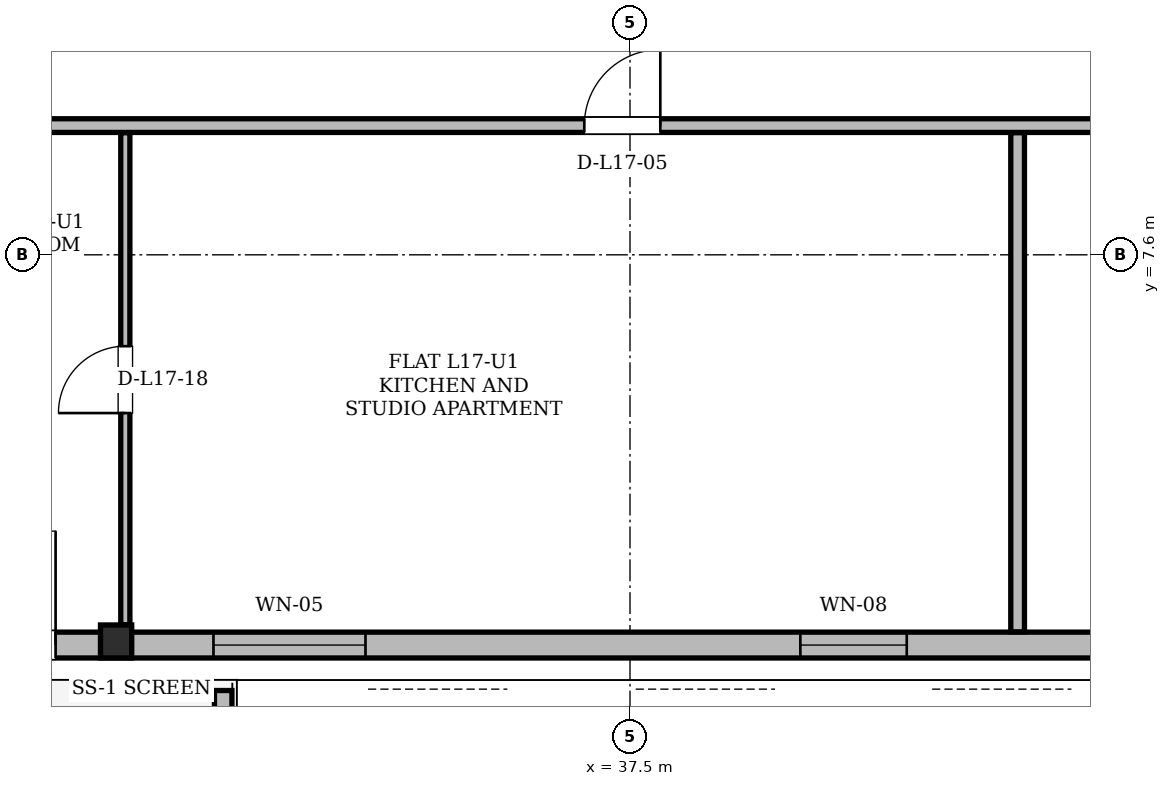
"""IFC4 building model, lengths in metres.
Left out: names, types, materials, properties, quantities, classifications, styles, units other than length and angle.
Written with IfcOpenShell. Run it as: python <this file> out.ifc"""

import sys

from ifc_helpers import new_model, si_unit, direction, frame, frame_2d, origin, origin_2d, place, context, subcontext, project, spatial, polyline, rectangle, i_section, outline, extrude, element, fill, save


model = new_model("IFC4")
c1 = context("Model", 3, precision=1e-05, world=origin(), true_north=direction((0.0, 1.0)))
c2 = subcontext(c1, "Body", "Model", "MODEL_VIEW")
j1 = project(units=[si_unit("LENGTHUNIT", "METRE"), si_unit("PLANEANGLEUNIT", "RADIAN")], contexts=[c1])
p1 = place(None, origin())
s1 = spatial("IfcSite", under=j1, at=p1, CompositionType="ELEMENT")
p2 = place(p1, origin())
s2 = spatial("IfcBuilding", under=s1, at=p2, CompositionType="ELEMENT")
p3 = place(p2, frame((0.0, 0.0, 66.9)))
s3 = spatial("IfcBuildingStorey", under=s2, at=p3, CompositionType="ELEMENT", Elevation=66.9)
p4 = place(p3, frame((30.747, 2.466, 0.005), z_axis=(-0.004893201568, 0.02636891956, 0.999640303639), x_axis=(-0.983214721584, -0.182452216376, 0.0)))
e1 = element("IfcColumn", 1, at=p4, inside=s3, PredefinedType="COLUMN", context=c2, shape_type="SweptSolid", body=[
    extrude(i_section(OverallWidth=0.411, OverallDepth=0.434, WebThickness=0.036, FlangeThickness=0.057, at=origin_2d()), origin(), (0.0, 0.0, 1.0), 3.592),
])
p5 = place(p3, frame((20.618, 2.466, 0.0), z_axis=(0.0, 0.0, 1.0), x_axis=(1.0, 0.0, 0.0)))
e2 = element("IfcWall", 2, at=p5, inside=s3, PredefinedType="SOLIDWALL", context=c2, shape_type="SweptSolid", body=[
    extrude(rectangle(XDim=33.764, YDim=0.34, at=frame_2d((16.882, 0.0))), origin(), (0.0, 0.0, 1.0), 2.494),
])
p6 = place(p5, frame((7.824, 0.0, 0.0)))
e3 = element("IfcOpeningElement", 3, at=p6, cuts=e2, PredefinedType="OPENING", context=c2, shape_type="SweptSolid", body=[
    extrude(rectangle(XDim=1.5, YDim=2.2, at=frame_2d((0.75, 1.1))), frame((0.0, 0.17, 0.0), z_axis=(0.0, -1.0, 0.0), x_axis=(1.0, 0.0, 0.0)), (0.0, 0.0, 1.0), 0.34),
])
p7 = place(p5, frame((26.104, 0.0, 0.0)))
e4 = element("IfcOpeningElement", 4, at=p7, cuts=e2, PredefinedType="OPENING", context=c2, shape_type="SweptSolid", body=[
    extrude(rectangle(XDim=1.5, YDim=2.2, at=frame_2d((0.75, 1.1))), frame((0.0, 0.17, 0.0), z_axis=(0.0, -1.0, 0.0), x_axis=(1.0, 0.0, 0.0)), (0.0, 0.0, 1.0), 0.34),
])
p8 = place(p5, frame((11.402, 0.0, 0.85)))
e5 = element("IfcOpeningElement", 5, at=p8, cuts=e2, PredefinedType="OPENING", context=c2, shape_type="SweptSolid", body=[
    extrude(rectangle(XDim=2.0, YDim=1.534, at=frame_2d((1.0, 0.767))), frame((0.0, 0.17, 0.0), z_axis=(0.0, -1.0, 0.0), x_axis=(1.0, 0.0, 0.0)), (0.0, 0.0, 1.0), 0.34),
])
p9 = place(p5, frame((19.123, 0.0, 0.85)))
e6 = element("IfcOpeningElement", 6, at=p9, cuts=e2, PredefinedType="OPENING", context=c2, shape_type="SweptSolid", body=[
    extrude(rectangle(XDim=1.4, YDim=1.534, at=frame_2d((0.7, 0.767))), frame((0.0, 0.17, 0.0), z_axis=(0.0, -1.0, 0.0), x_axis=(1.0, 0.0, 0.0)), (0.0, 0.0, 1.0), 0.34),
])
p10 = place(p5, frame((24.583, 0.0, 0.85)))
e7 = element("IfcOpeningElement", 7, at=p10, cuts=e2, PredefinedType="OPENING", context=c2, shape_type="SweptSolid", body=[
    extrude(rectangle(XDim=1.2, YDim=1.48, at=frame_2d((0.6, 0.74))), frame((0.0, 0.17, 0.0), z_axis=(0.0, -1.0, 0.0), x_axis=(1.0, 0.0, 0.0)), (0.0, 0.0, 1.0), 0.34),
])
p11 = place(p5, frame((29.528, 0.0, 0.85)))
e8 = element("IfcOpeningElement", 8, at=p11, cuts=e2, PredefinedType="OPENING", context=c2, shape_type="SweptSolid", body=[
    extrude(rectangle(XDim=3.0, YDim=1.534, at=frame_2d((1.5, 0.767))), frame((0.0, 0.17, 0.0), z_axis=(0.0, -1.0, 0.0), x_axis=(1.0, 0.0, 0.0)), (0.0, 0.0, 1.0), 0.34),
])
p12 = place(p5, frame((0.989, 0.0, 0.85)))
e9 = element("IfcOpeningElement", 9, at=p12, cuts=e2, PredefinedType="OPENING", context=c2, shape_type="SweptSolid", body=[
    extrude(rectangle(XDim=1.2, YDim=1.48, at=frame_2d((0.6, 0.74))), frame((0.0, 0.17, 0.0), z_axis=(0.0, -1.0, 0.0), x_axis=(1.0, 0.0, 0.0)), (0.0, 0.0, 1.0), 0.34),
])
p13 = place(p5, frame((3.417, 0.0, 0.85)))
e10 = element("IfcOpeningElement", 10, at=p13, cuts=e2, PredefinedType="OPENING", context=c2, shape_type="SweptSolid", body=[
    extrude(rectangle(XDim=1.2, YDim=1.48, at=frame_2d((0.6, 0.74))), frame((0.0, 0.17, 0.0), z_axis=(0.0, -1.0, 0.0), x_axis=(1.0, 0.0, 0.0)), (0.0, 0.0, 1.0), 0.34),
])
p14 = place(p3, frame((32.148, 1.868, 0.0), z_axis=(0.0, 0.0, 1.0), x_axis=(0.0, -1.0, 0.0)))
e11 = element("IfcWall", 11, at=p14, inside=s3, PredefinedType="PARAPET", context=c2, shape_type="SweptSolid", body=[
    extrude(outline(polyline([(0.0, 0.0), (2.042, 0.0), (2.042, 1.1), (0.0, 1.32), (0.0, 0.0)])), frame((0.0, 0.115, 0.0), z_axis=(0.0, -1.0, 0.0), x_axis=(1.0, 0.0, 0.0)), (0.0, 0.0, 1.0), 0.23),
])
p15 = place(p3, frame((19.2, 9.3, 0.0), z_axis=(0.0, 0.0, 1.0), x_axis=(1.0, 0.0, 0.0)))
e12 = element("IfcWall", 12, at=p15, inside=s3, PredefinedType="PARTITIONING", context=c2, shape_type="SweptSolid", body=[
    extrude(rectangle(XDim=36.6, YDim=0.18, at=frame_2d((18.3, 0.0))), origin(), (0.0, 0.0, 1.0), 2.738),
])
p16 = place(p15, frame((3.844, 0.0, 0.0)))
e13 = element("IfcOpeningElement", 13, at=p16, cuts=e12, PredefinedType="OPENING", context=c2, shape_type="SweptSolid", body=[
    extrude(rectangle(XDim=1.0, YDim=2.18, at=frame_2d((0.5, 1.09))), frame((0.0, 0.09, 0.0), z_axis=(0.0, -1.0, 0.0), x_axis=(1.0, 0.0, 0.0)), (0.0, 0.0, 1.0), 0.18),
])
p17 = place(p15, frame((17.699, 0.0, 0.0)))
e14 = element("IfcOpeningElement", 14, at=p17, cuts=e12, PredefinedType="OPENING", context=c2, shape_type="SweptSolid", body=[
    extrude(rectangle(XDim=1.0, YDim=2.18, at=frame_2d((0.5, 1.09))), frame((0.0, 0.09, 0.0), z_axis=(0.0, -1.0, 0.0), x_axis=(1.0, 0.0, 0.0)), (0.0, 0.0, 1.0), 0.18),
])
p18 = place(p15, frame((28.991, 0.0, 0.0)))
e15 = element("IfcOpeningElement", 15, at=p18, cuts=e12, PredefinedType="OPENING", context=c2, shape_type="SweptSolid", body=[
    extrude(rectangle(XDim=1.0, YDim=2.18, at=frame_2d((0.5, 1.09))), frame((0.0, 0.09, 0.0), z_axis=(0.0, -1.0, 0.0), x_axis=(1.0, 0.0, 0.0)), (0.0, 0.0, 1.0), 0.18),
])
p19 = place(p3, frame((30.86, 2.734, 0.0), z_axis=(0.0, 0.0, 1.0), x_axis=(0.0, 1.0, 0.0)))
e16 = element("IfcWall", 16, at=p19, inside=s3, PredefinedType="PARTITIONING", context=c2, shape_type="SweptSolid", body=[
    extrude(rectangle(XDim=6.472, YDim=0.12, at=frame_2d((3.236, 0.0))), origin(), (0.0, 0.0, 1.0), 2.946),
])
p20 = place(p19, frame((2.784, 0.0, 0.0)))
e17 = element("IfcOpeningElement", 17, at=p20, cuts=e16, PredefinedType="OPENING", context=c2, shape_type="SweptSolid", body=[
    extrude(rectangle(XDim=0.88, YDim=2.08, at=frame_2d((0.44, 1.04))), frame((0.0, 0.06, 0.0), z_axis=(0.0, -1.0, 0.0), x_axis=(1.0, 0.0, 0.0)), (0.0, 0.0, 1.0), 0.12),
])
p21 = place(p3, frame((42.6, 2.64, 0.0), z_axis=(0.0, 0.0, 1.0), x_axis=(0.0, 1.0, 0.0)))
e18 = element("IfcWall", 18, at=p21, inside=s3, PredefinedType="PARTITIONING", context=c2, shape_type="SweptSolid", body=[
    extrude(rectangle(XDim=6.566, YDim=0.18, at=frame_2d((3.283, 0.0))), origin(), (0.0, 0.0, 1.0), 2.946),
])
p22 = place(p6, origin())
e19 = element("IfcDoor", 19, at=p22, inside=s3, OperationType="SINGLE_SWING_RIGHT", PredefinedType="DOOR", context=c2, shape_type="SweptSolid", body=[
    extrude(rectangle(XDim=1.5, YDim=2.2, at=frame_2d((0.75, 1.1))), frame((0.0, 0.025, 0.0), z_axis=(0.0, -1.0, 0.0), x_axis=(1.0, 0.0, 0.0)), (0.0, 0.0, 1.0), 0.05),
])
fill(e3, e19)
p23 = place(p8, origin())
e20 = element("IfcWindow", 20, at=p23, inside=s3, PartitioningType="SINGLE_PANEL", PredefinedType="WINDOW", context=c2, shape_type="SweptSolid", body=[
    extrude(rectangle(XDim=2.0, YDim=1.534, at=frame_2d((1.0, 0.767))), frame((0.0, 0.03, 0.0), z_axis=(0.0, -1.0, 0.0), x_axis=(1.0, 0.0, 0.0)), (0.0, 0.0, 1.0), 0.06),
])
fill(e5, e20)
p24 = place(p9, origin())
e21 = element("IfcWindow", 21, at=p24, inside=s3, PartitioningType="SINGLE_PANEL", PredefinedType="WINDOW", context=c2, shape_type="SweptSolid", body=[
    extrude(rectangle(XDim=1.4, YDim=1.534, at=frame_2d((0.7, 0.767))), frame((0.0, 0.03, 0.0), z_axis=(0.0, -1.0, 0.0), x_axis=(1.0, 0.0, 0.0)), (0.0, 0.0, 1.0), 0.06),
])
fill(e6, e21)
p25 = place(p17, origin())
e22 = element("IfcDoor", 22, at=p25, inside=s3, OperationType="SINGLE_SWING_RIGHT", PredefinedType="DOOR", context=c2, shape_type="SweptSolid", body=[
    extrude(rectangle(XDim=1.0, YDim=2.18, at=frame_2d((0.5, 1.09))), frame((0.0, 0.025, 0.0), z_axis=(0.0, -1.0, 0.0), x_axis=(1.0, 0.0, 0.0)), (0.0, 0.0, 1.0), 0.05),
])
fill(e14, e22)
p26 = place(p20, origin())
e23 = element("IfcDoor", 23, at=p26, inside=s3, OperationType="SINGLE_SWING_LEFT", PredefinedType="DOOR", context=c2, shape_type="SweptSolid", body=[
    extrude(rectangle(XDim=0.88, YDim=2.08, at=frame_2d((0.44, 1.04))), frame((0.0, 0.025, 0.0), z_axis=(0.0, -1.0, 0.0), x_axis=(1.0, 0.0, 0.0)), (0.0, 0.0, 1.0), 0.05),
])
fill(e17, e23)
save(model, sys.argv[1])
